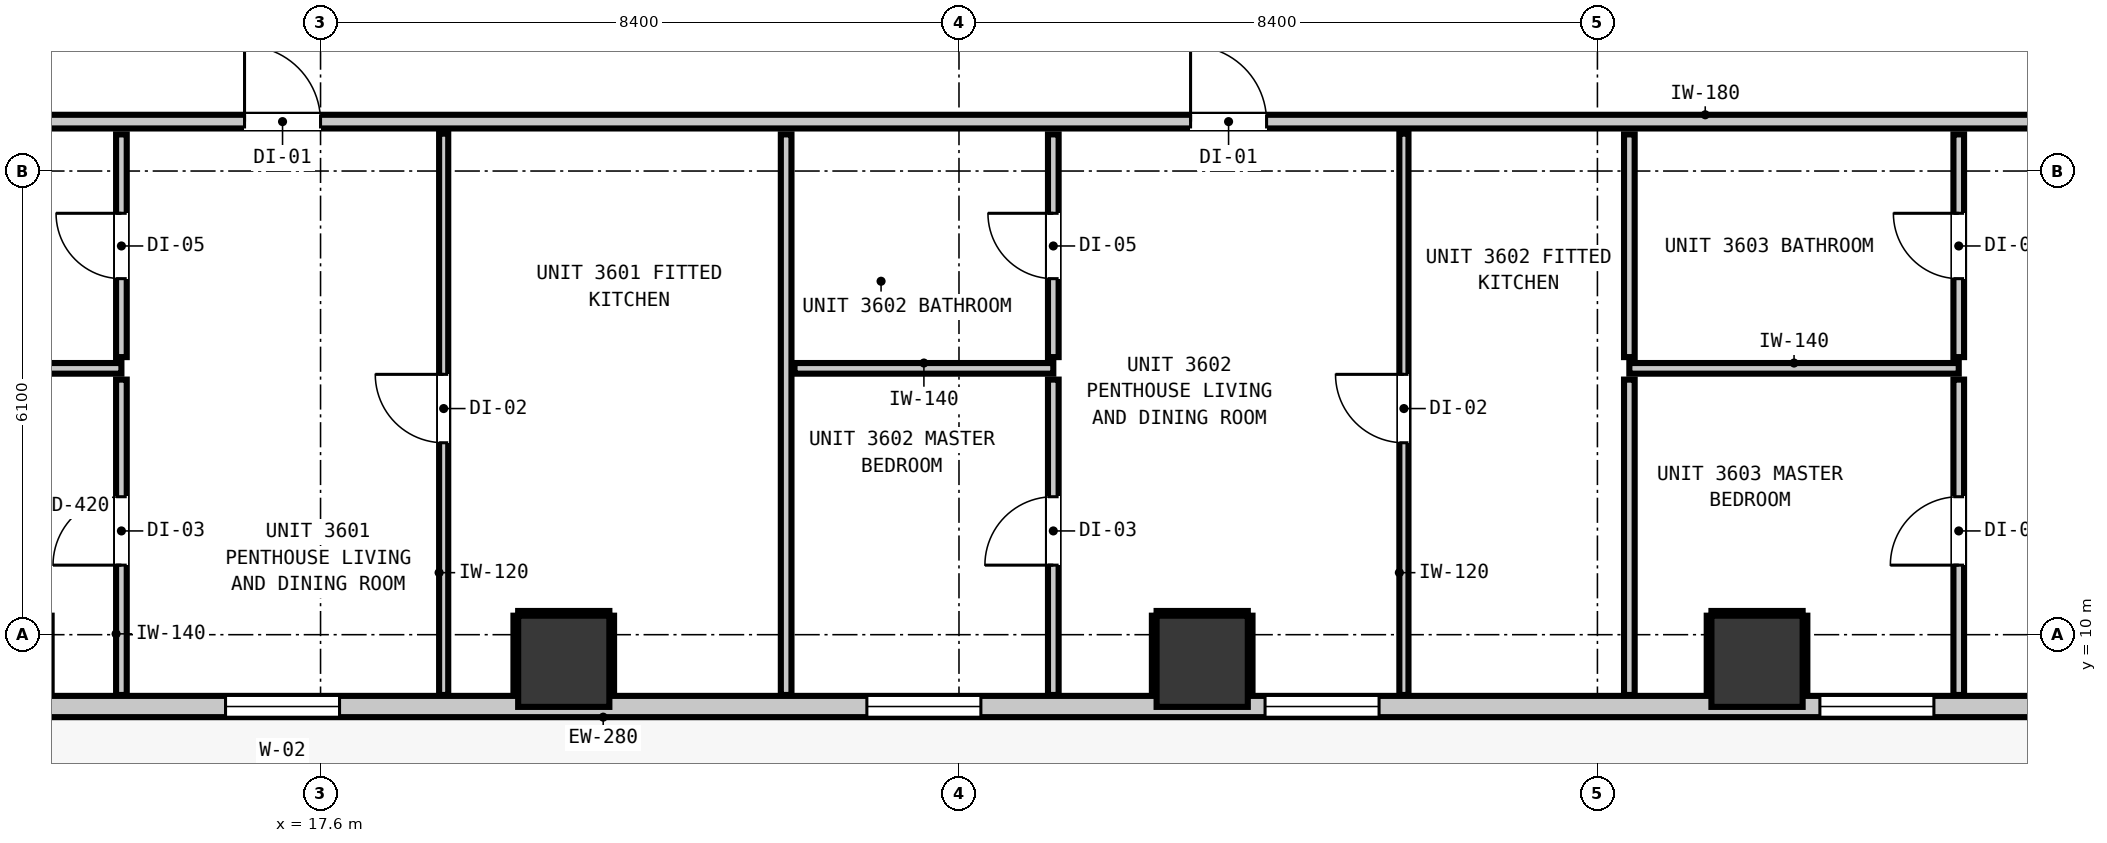
"""IFC4 building model, lengths in metres.
Left out: names, types, materials, properties, quantities, classifications, styles, units other than length and angle.
Written with IfcOpenShell. Run it as: python <this file> out.ifc"""

import sys

from ifc_helpers import new_model, si_unit, direction, frame, frame_2d, origin, origin_2d, place, context, subcontext, project, spatial, rectangle, extrude, element, fill, save


model = new_model("IFC4")
c1 = context("Model", 3, precision=1e-05, world=origin(), true_north=direction((0.0, 1.0)))
c2 = subcontext(c1, "Body", "Model", "MODEL_VIEW")
j1 = project(units=[si_unit("LENGTHUNIT", "METRE"), si_unit("PLANEANGLEUNIT", "RADIAN")], contexts=[c1])
p1 = place(None, origin())
s1 = spatial("IfcSite", under=j1, at=p1, CompositionType="ELEMENT")
p2 = place(p1, origin())
s2 = spatial("IfcBuilding", under=s1, at=p2, CompositionType="ELEMENT")
p3 = place(p2, frame((0.0, 0.0, 126.0)))
s3 = spatial("IfcBuildingStorey", under=s2, at=p3, CompositionType="ELEMENT", Elevation=126.0)
for number, where, z_axis, x_axis in (
    (1, (20.8, 9.65, -0.2), (0.0, 0.0, 1.0), (1.0, 0.0, 0.0)),
    (2, (29.2, 9.65, -0.2), (0.0, 0.0, 1.0), (1.0, 0.0, 0.0)),
    (3, (36.5, 9.65, -0.2), (0.0, 0.0, 1.0), (1.0, 0.0, 0.0)),
):
    element("IfcColumn", number, at=place(p3, frame(where, z_axis=z_axis, x_axis=x_axis)), inside=s3, PredefinedType="COLUMN", context=c2, shape_type="SweptSolid", body=[
        extrude(rectangle(XDim=1.2, YDim=1.2, at=origin_2d()), origin(), (0.0, 0.0, 1.0), 3.52),
    ])
p4 = place(p3, frame((46.645, 9.055, 0.0), z_axis=(0.0, 0.0, 1.0), x_axis=(-1.0, 0.0, 0.0)))
e4 = element("IfcWall", 4, at=p4, inside=s3, PredefinedType="STANDARD", context=c2, shape_type="SweptSolid", body=[
    extrude(rectangle(XDim=35.09, YDim=0.28, at=frame_2d((17.545, 0.0))), origin(), (0.0, 0.0, 1.0), 3.08),
])
p5 = place(p4, frame((2.307, 0.0, 0.0)))
e5 = element("IfcOpeningElement", 5, at=p5, cuts=e4, PredefinedType="OPENING", context=c2, shape_type="SweptSolid", body=[
    extrude(rectangle(XDim=1.0, YDim=2.15, at=frame_2d((0.5, 1.075))), frame((0.0, 0.15, 0.0), z_axis=(0.0, -1.0, 0.0), x_axis=(1.0, 0.0, 0.0)), (0.0, 0.0, 1.0), 0.3),
])
p6 = place(p4, frame((28.795, 0.0, 0.85)))
e6 = element("IfcOpeningElement", 6, at=p6, cuts=e4, PredefinedType="OPENING", context=c2, shape_type="SweptSolid", body=[
    extrude(rectangle(XDim=1.5, YDim=1.8, at=frame_2d((0.75, 0.9))), frame((0.0, 0.15, 0.0), z_axis=(0.0, -1.0, 0.0), x_axis=(1.0, 0.0, 0.0)), (0.0, 0.0, 1.0), 0.3),
])
p7 = place(p4, frame((34.133, 0.0, 0.85)))
e7 = element("IfcOpeningElement", 7, at=p7, cuts=e4, PredefinedType="OPENING", context=c2, shape_type="SweptSolid", body=[
    extrude(rectangle(XDim=0.58, YDim=1.5, at=frame_2d((0.29, 0.75))), frame((0.0, 0.15, 0.0), z_axis=(0.0, -1.0, 0.0), x_axis=(1.0, 0.0, 0.0)), (0.0, 0.0, 1.0), 0.3),
])
p8 = place(p4, frame((15.118, 0.0, 0.85)))
e8 = element("IfcOpeningElement", 8, at=p8, cuts=e4, PredefinedType="OPENING", context=c2, shape_type="SweptSolid", body=[
    extrude(rectangle(XDim=1.5, YDim=1.8, at=frame_2d((0.75, 0.9))), frame((0.0, 0.15, 0.0), z_axis=(0.0, -1.0, 0.0), x_axis=(1.0, 0.0, 0.0)), (0.0, 0.0, 1.0), 0.3),
])
p9 = place(p4, frame((20.357, 0.0, 0.85)))
e9 = element("IfcOpeningElement", 9, at=p9, cuts=e4, PredefinedType="OPENING", context=c2, shape_type="SweptSolid", body=[
    extrude(rectangle(XDim=1.5, YDim=1.8, at=frame_2d((0.75, 0.9))), frame((0.0, 0.15, 0.0), z_axis=(0.0, -1.0, 0.0), x_axis=(1.0, 0.0, 0.0)), (0.0, 0.0, 1.0), 0.3),
])
p10 = place(p4, frame((4.699, 0.0, 0.85)))
e10 = element("IfcOpeningElement", 10, at=p10, cuts=e4, PredefinedType="OPENING", context=c2, shape_type="SweptSolid", body=[
    extrude(rectangle(XDim=1.5, YDim=1.8, at=frame_2d((0.75, 0.9))), frame((0.0, 0.15, 0.0), z_axis=(0.0, -1.0, 0.0), x_axis=(1.0, 0.0, 0.0)), (0.0, 0.0, 1.0), 0.3),
])
p11 = place(p4, frame((7.818, 0.0, 0.85)))
e11 = element("IfcOpeningElement", 11, at=p11, cuts=e4, PredefinedType="OPENING", context=c2, shape_type="SweptSolid", body=[
    extrude(rectangle(XDim=1.5, YDim=1.8, at=frame_2d((0.75, 0.9))), frame((0.0, 0.15, 0.0), z_axis=(0.0, -1.0, 0.0), x_axis=(1.0, 0.0, 0.0)), (0.0, 0.0, 1.0), 0.3),
])
p12 = place(p3, frame((9.407, 16.75, 0.0), z_axis=(0.0, 0.0, 1.0), x_axis=(1.0, 0.0, 0.0)))
e12 = element("IfcWall", 12, at=p12, inside=s3, PredefinedType="PARTITIONING", context=c2, shape_type="SweptSolid", body=[
    extrude(rectangle(XDim=39.386, YDim=0.18, at=frame_2d((19.693, 0.0))), origin(), (0.0, 0.0, 1.0), 3.08),
])
p13 = place(p12, frame((7.193, 0.0, 0.0)))
e13 = element("IfcOpeningElement", 13, at=p13, cuts=e12, PredefinedType="OPENING", context=c2, shape_type="SweptSolid", body=[
    extrude(rectangle(XDim=1.0, YDim=2.15, at=frame_2d((0.5, 1.075))), frame((0.0, 0.1, 0.0), z_axis=(0.0, -1.0, 0.0), x_axis=(1.0, 0.0, 0.0)), (0.0, 0.0, 1.0), 0.2),
])
p14 = place(p12, frame((19.64, 0.0, 0.0)))
e14 = element("IfcOpeningElement", 14, at=p14, cuts=e12, PredefinedType="OPENING", context=c2, shape_type="SweptSolid", body=[
    extrude(rectangle(XDim=1.0, YDim=2.15, at=frame_2d((0.5, 1.075))), frame((0.0, 0.1, 0.0), z_axis=(0.0, -1.0, 0.0), x_axis=(1.0, 0.0, 0.0)), (0.0, 0.0, 1.0), 0.2),
])
p15 = place(p12, frame((32.183, 0.0, 0.0)))
e15 = element("IfcOpeningElement", 15, at=p15, cuts=e12, PredefinedType="OPENING", context=c2, shape_type="SweptSolid", body=[
    extrude(rectangle(XDim=1.0, YDim=2.15, at=frame_2d((0.5, 1.075))), frame((0.0, 0.1, 0.0), z_axis=(0.0, -1.0, 0.0), x_axis=(1.0, 0.0, 0.0)), (0.0, 0.0, 1.0), 0.2),
])
p16 = place(p3, frame((9.407, 13.504, 0.0), z_axis=(0.0, 0.0, 1.0), x_axis=(1.0, 0.0, 0.0)))
e16 = element("IfcWall", 16, at=p16, inside=s3, PredefinedType="PARTITIONING", context=c2, shape_type="SweptSolid", body=[
    extrude(rectangle(XDim=5.573, YDim=0.14, at=frame_2d((2.787, 0.0))), origin(), (0.0, 0.0, 1.0), 3.08),
])
p17 = place(p3, frame((23.836, 13.504, 0.0), z_axis=(0.0, 0.0, 1.0), x_axis=(1.0, 0.0, 0.0)))
e17 = element("IfcWall", 17, at=p17, inside=s3, PredefinedType="PARTITIONING", context=c2, shape_type="SweptSolid", body=[
    extrude(rectangle(XDim=3.405, YDim=0.14, at=frame_2d((1.703, 0.0))), origin(), (0.0, 0.0, 1.0), 3.08),
])
p18 = place(p3, frame((34.82, 13.504, 0.0), z_axis=(0.0, 0.0, 1.0), x_axis=(1.0, 0.0, 0.0)))
e18 = element("IfcWall", 18, at=p18, inside=s3, PredefinedType="PARTITIONING", context=c2, shape_type="SweptSolid", body=[
    extrude(rectangle(XDim=4.334, YDim=0.14, at=frame_2d((2.167, 0.0))), origin(), (0.0, 0.0, 1.0), 3.08),
])
p19 = place(p3, frame((14.98, 9.207, 0.0), z_axis=(0.0, 0.0, 1.0), x_axis=(0.0, 1.0, 0.0)))
e19 = element("IfcWall", 19, at=p19, inside=s3, PredefinedType="PARTITIONING", context=c2, shape_type="SweptSolid", body=[
    extrude(rectangle(XDim=4.149, YDim=0.14, at=frame_2d((2.074, 0.0))), origin(), (0.0, 0.0, 1.0), 3.08),
])
p20 = place(p19, frame((1.708, 0.0, 0.0)))
e20 = element("IfcOpeningElement", 20, at=p20, cuts=e19, PredefinedType="OPENING", context=c2, shape_type="SweptSolid", body=[
    extrude(rectangle(XDim=0.9, YDim=2.1, at=frame_2d((0.45, 1.05))), frame((0.0, 0.08, 0.0), z_axis=(0.0, -1.0, 0.0), x_axis=(1.0, 0.0, 0.0)), (0.0, 0.0, 1.0), 0.16),
])
p21 = place(p3, frame((14.98, 13.652, 0.0), z_axis=(0.0, 0.0, 1.0), x_axis=(0.0, 1.0, 0.0)))
e21 = element("IfcWall", 21, at=p21, inside=s3, PredefinedType="PARTITIONING", context=c2, shape_type="SweptSolid", body=[
    extrude(rectangle(XDim=2.93, YDim=0.14, at=frame_2d((1.465, 0.0))), origin(), (0.0, 0.0, 1.0), 3.08),
])
p22 = place(p21, frame((1.032, 0.0, 0.0)))
e22 = element("IfcOpeningElement", 22, at=p22, cuts=e21, PredefinedType="OPENING", context=c2, shape_type="SweptSolid", body=[
    extrude(rectangle(XDim=0.86, YDim=2.02, at=frame_2d((0.43, 1.01))), frame((0.0, 0.08, 0.0), z_axis=(0.0, -1.0, 0.0), x_axis=(1.0, 0.0, 0.0)), (0.0, 0.0, 1.0), 0.16),
])
p23 = place(p3, frame((23.726, 9.207, 0.0), z_axis=(0.0, 0.0, 1.0), x_axis=(0.0, 1.0, 0.0)))
e23 = element("IfcWall", 23, at=p23, inside=s3, PredefinedType="PARTITIONING", context=c2, shape_type="SweptSolid", body=[
    extrude(rectangle(XDim=7.375, YDim=0.14, at=frame_2d((3.688, 0.0))), origin(), (0.0, 0.0, 1.0), 3.08),
])
p24 = place(p3, frame((27.241, 9.207, 0.0), z_axis=(0.0, 0.0, 1.0), x_axis=(0.0, 1.0, 0.0)))
e24 = element("IfcWall", 24, at=p24, inside=s3, PredefinedType="PARTITIONING", context=c2, shape_type="SweptSolid", body=[
    extrude(rectangle(XDim=4.149, YDim=0.14, at=frame_2d((2.074, 0.0))), origin(), (0.0, 0.0, 1.0), 3.08),
])
p25 = place(p24, frame((1.708, 0.0, 0.0)))
e25 = element("IfcOpeningElement", 25, at=p25, cuts=e24, PredefinedType="OPENING", context=c2, shape_type="SweptSolid", body=[
    extrude(rectangle(XDim=0.9, YDim=2.1, at=frame_2d((0.45, 1.05))), frame((0.0, 0.08, 0.0), z_axis=(0.0, -1.0, 0.0), x_axis=(1.0, 0.0, 0.0)), (0.0, 0.0, 1.0), 0.16),
])
p26 = place(p3, frame((27.241, 13.652, 0.0), z_axis=(0.0, 0.0, 1.0), x_axis=(0.0, 1.0, 0.0)))
e26 = element("IfcWall", 26, at=p26, inside=s3, PredefinedType="PARTITIONING", context=c2, shape_type="SweptSolid", body=[
    extrude(rectangle(XDim=2.93, YDim=0.14, at=frame_2d((1.465, 0.0))), origin(), (0.0, 0.0, 1.0), 3.08),
])
p27 = place(p26, frame((1.032, 0.0, 0.0)))
e27 = element("IfcOpeningElement", 27, at=p27, cuts=e26, PredefinedType="OPENING", context=c2, shape_type="SweptSolid", body=[
    extrude(rectangle(XDim=0.86, YDim=2.02, at=frame_2d((0.43, 1.01))), frame((0.0, 0.08, 0.0), z_axis=(0.0, -1.0, 0.0), x_axis=(1.0, 0.0, 0.0)), (0.0, 0.0, 1.0), 0.16),
])
p28 = place(p3, frame((34.82, 9.207, 0.0), z_axis=(0.0, 0.0, 1.0), x_axis=(0.0, 1.0, 0.0)))
e28 = element("IfcWall", 28, at=p28, inside=s3, PredefinedType="PARTITIONING", context=c2, shape_type="SweptSolid", body=[
    extrude(rectangle(XDim=4.149, YDim=0.14, at=frame_2d((2.074, 0.0))), origin(), (0.0, 0.0, 1.0), 3.08),
])
p29 = place(p3, frame((34.82, 13.652, 0.0), z_axis=(0.0, 0.0, 1.0), x_axis=(0.0, 1.0, 0.0)))
e29 = element("IfcWall", 29, at=p29, inside=s3, PredefinedType="PARTITIONING", context=c2, shape_type="SweptSolid", body=[
    extrude(rectangle(XDim=2.93, YDim=0.14, at=frame_2d((1.465, 0.0))), origin(), (0.0, 0.0, 1.0), 3.08),
])
p30 = place(p3, frame((39.154, 9.207, 0.0), z_axis=(0.0, 0.0, 1.0), x_axis=(0.0, 1.0, 0.0)))
e30 = element("IfcWall", 30, at=p30, inside=s3, PredefinedType="PARTITIONING", context=c2, shape_type="SweptSolid", body=[
    extrude(rectangle(XDim=4.149, YDim=0.14, at=frame_2d((2.074, 0.0))), origin(), (0.0, 0.0, 1.0), 3.08),
])
p31 = place(p30, frame((1.708, 0.0, 0.0)))
e31 = element("IfcOpeningElement", 31, at=p31, cuts=e30, PredefinedType="OPENING", context=c2, shape_type="SweptSolid", body=[
    extrude(rectangle(XDim=0.9, YDim=2.1, at=frame_2d((0.45, 1.05))), frame((0.0, 0.08, 0.0), z_axis=(0.0, -1.0, 0.0), x_axis=(1.0, 0.0, 0.0)), (0.0, 0.0, 1.0), 0.16),
])
p32 = place(p3, frame((39.154, 13.652, 0.0), z_axis=(0.0, 0.0, 1.0), x_axis=(0.0, 1.0, 0.0)))
e32 = element("IfcWall", 32, at=p32, inside=s3, PredefinedType="PARTITIONING", context=c2, shape_type="SweptSolid", body=[
    extrude(rectangle(XDim=2.93, YDim=0.14, at=frame_2d((1.465, 0.0))), origin(), (0.0, 0.0, 1.0), 3.08),
])
p33 = place(p32, frame((1.032, 0.0, 0.0)))
e33 = element("IfcOpeningElement", 33, at=p33, cuts=e32, PredefinedType="OPENING", context=c2, shape_type="SweptSolid", body=[
    extrude(rectangle(XDim=0.86, YDim=2.02, at=frame_2d((0.43, 1.01))), frame((0.0, 0.08, 0.0), z_axis=(0.0, -1.0, 0.0), x_axis=(1.0, 0.0, 0.0)), (0.0, 0.0, 1.0), 0.16),
])
p34 = place(p3, frame((19.22, 9.207, 0.0), z_axis=(0.0, 0.0, 1.0), x_axis=(0.0, 1.0, 0.0)))
e34 = element("IfcWall", 34, at=p34, inside=s3, PredefinedType="PARTITIONING", context=c2, shape_type="SweptSolid", body=[
    extrude(rectangle(XDim=7.385, YDim=0.12, at=frame_2d((3.692, 0.0))), origin(), (0.0, 0.0, 1.0), 3.08),
])
p35 = place(p34, frame((3.318, 0.0, 0.0)))
e35 = element("IfcOpeningElement", 35, at=p35, cuts=e34, PredefinedType="OPENING", context=c2, shape_type="SweptSolid", body=[
    extrude(rectangle(XDim=0.9, YDim=2.1, at=frame_2d((0.45, 1.05))), frame((0.0, 0.07, 0.0), z_axis=(0.0, -1.0, 0.0), x_axis=(1.0, 0.0, 0.0)), (0.0, 0.0, 1.0), 0.14),
])
p36 = place(p3, frame((31.854, 9.207, 0.0), z_axis=(0.0, 0.0, 1.0), x_axis=(0.0, 1.0, 0.0)))
e36 = element("IfcWall", 36, at=p36, inside=s3, PredefinedType="PARTITIONING", context=c2, shape_type="SweptSolid", body=[
    extrude(rectangle(XDim=7.385, YDim=0.12, at=frame_2d((3.692, 0.0))), origin(), (0.0, 0.0, 1.0), 3.08),
])
p37 = place(p36, frame((3.318, 0.0, 0.0)))
e37 = element("IfcOpeningElement", 37, at=p37, cuts=e36, PredefinedType="OPENING", context=c2, shape_type="SweptSolid", body=[
    extrude(rectangle(XDim=0.9, YDim=2.1, at=frame_2d((0.45, 1.05))), frame((0.0, 0.07, 0.0), z_axis=(0.0, -1.0, 0.0), x_axis=(1.0, 0.0, 0.0)), (0.0, 0.0, 1.0), 0.14),
])
p38 = place(p3, frame((20.2, 10.282, 0.0), z_axis=(0.0, 0.0, 1.0), x_axis=(1.0, 0.0, 0.0)))
e38 = element("IfcWall", 38, at=p38, inside=s3, PredefinedType="PARTITIONING", context=c2, shape_type="SweptSolid", body=[
    extrude(rectangle(XDim=1.2, YDim=0.06, at=frame_2d((0.6, 0.0))), origin(), (0.0, 0.0, 1.0), 1.45),
])
for number, where, z_axis, x_axis in (
    (39, (20.168, 9.21, 0.0), (0.0, 0.0, 1.0), (0.0, 1.0, 0.0)),
    (40, (21.432, 9.21, 0.0), (0.0, 0.0, 1.0), (0.0, 1.0, 0.0)),
):
    element("IfcWall", number, at=place(p3, frame(where, z_axis=z_axis, x_axis=x_axis)), inside=s3, PredefinedType="PARTITIONING", context=c2, shape_type="SweptSolid", body=[
        extrude(rectangle(XDim=1.04, YDim=0.06, at=frame_2d((0.52, 0.0))), origin(), (0.0, 0.0, 1.0), 1.45),
    ])
p39 = place(p3, frame((28.6, 10.282, 0.0), z_axis=(0.0, 0.0, 1.0), x_axis=(1.0, 0.0, 0.0)))
e41 = element("IfcWall", 41, at=p39, inside=s3, PredefinedType="PARTITIONING", context=c2, shape_type="SweptSolid", body=[
    extrude(rectangle(XDim=1.2, YDim=0.06, at=frame_2d((0.6, 0.0))), origin(), (0.0, 0.0, 1.0), 1.45),
])
for number, where, z_axis, x_axis in (
    (42, (28.568, 9.21, 0.0), (0.0, 0.0, 1.0), (0.0, 1.0, 0.0)),
    (43, (29.832, 9.21, 0.0), (0.0, 0.0, 1.0), (0.0, 1.0, 0.0)),
):
    element("IfcWall", number, at=place(p3, frame(where, z_axis=z_axis, x_axis=x_axis)), inside=s3, PredefinedType="PARTITIONING", context=c2, shape_type="SweptSolid", body=[
        extrude(rectangle(XDim=1.04, YDim=0.06, at=frame_2d((0.52, 0.0))), origin(), (0.0, 0.0, 1.0), 1.45),
    ])
p40 = place(p3, frame((35.9, 10.282, 0.0), z_axis=(0.0, 0.0, 1.0), x_axis=(1.0, 0.0, 0.0)))
e44 = element("IfcWall", 44, at=p40, inside=s3, PredefinedType="PARTITIONING", context=c2, shape_type="SweptSolid", body=[
    extrude(rectangle(XDim=1.2, YDim=0.06, at=frame_2d((0.6, 0.0))), origin(), (0.0, 0.0, 1.0), 1.45),
])
for number, where, z_axis, x_axis in (
    (45, (35.868, 9.21, 0.0), (0.0, 0.0, 1.0), (0.0, 1.0, 0.0)),
    (46, (37.132, 9.21, 0.0), (0.0, 0.0, 1.0), (0.0, 1.0, 0.0)),
):
    element("IfcWall", number, at=place(p3, frame(where, z_axis=z_axis, x_axis=x_axis)), inside=s3, PredefinedType="PARTITIONING", context=c2, shape_type="SweptSolid", body=[
        extrude(rectangle(XDim=1.04, YDim=0.06, at=frame_2d((0.52, 0.0))), origin(), (0.0, 0.0, 1.0), 1.45),
    ])
p41 = place(p6, origin())
e47 = element("IfcWindow", 47, at=p41, inside=s3, PartitioningType="SINGLE_PANEL", PredefinedType="WINDOW", context=c2, shape_type="SweptSolid", body=[
    extrude(rectangle(XDim=1.5, YDim=1.8, at=frame_2d((0.75, 0.9))), frame((0.0, 0.03, 0.0), z_axis=(0.0, -1.0, 0.0), x_axis=(1.0, 0.0, 0.0)), (0.0, 0.0, 1.0), 0.06),
])
fill(e6, e47)
p42 = place(p8, origin())
e48 = element("IfcWindow", 48, at=p42, inside=s3, PartitioningType="SINGLE_PANEL", PredefinedType="WINDOW", context=c2, shape_type="SweptSolid", body=[
    extrude(rectangle(XDim=1.5, YDim=1.8, at=frame_2d((0.75, 0.9))), frame((0.0, 0.03, 0.0), z_axis=(0.0, -1.0, 0.0), x_axis=(1.0, 0.0, 0.0)), (0.0, 0.0, 1.0), 0.06),
])
fill(e8, e48)
p43 = place(p9, origin())
e49 = element("IfcWindow", 49, at=p43, inside=s3, PartitioningType="SINGLE_PANEL", PredefinedType="WINDOW", context=c2, shape_type="SweptSolid", body=[
    extrude(rectangle(XDim=1.5, YDim=1.8, at=frame_2d((0.75, 0.9))), frame((0.0, 0.03, 0.0), z_axis=(0.0, -1.0, 0.0), x_axis=(1.0, 0.0, 0.0)), (0.0, 0.0, 1.0), 0.06),
])
fill(e9, e49)
p44 = place(p11, origin())
e50 = element("IfcWindow", 50, at=p44, inside=s3, PartitioningType="SINGLE_PANEL", PredefinedType="WINDOW", context=c2, shape_type="SweptSolid", body=[
    extrude(rectangle(XDim=1.5, YDim=1.8, at=frame_2d((0.75, 0.9))), frame((0.0, 0.03, 0.0), z_axis=(0.0, -1.0, 0.0), x_axis=(1.0, 0.0, 0.0)), (0.0, 0.0, 1.0), 0.06),
])
fill(e11, e50)
p45 = place(p13, origin())
e51 = element("IfcDoor", 51, at=p45, inside=s3, OperationType="SINGLE_SWING_LEFT", PredefinedType="DOOR", context=c2, shape_type="SweptSolid", body=[
    extrude(rectangle(XDim=1.0, YDim=2.15, at=frame_2d((0.5, 1.075))), frame((0.0, 0.025, 0.0), z_axis=(0.0, -1.0, 0.0), x_axis=(1.0, 0.0, 0.0)), (0.0, 0.0, 1.0), 0.05),
])
fill(e13, e51)
p46 = place(p22, origin())
e52 = element("IfcDoor", 52, at=p46, inside=s3, OperationType="SINGLE_SWING_RIGHT", PredefinedType="DOOR", context=c2, shape_type="SweptSolid", body=[
    extrude(rectangle(XDim=0.86, YDim=2.02, at=frame_2d((0.43, 1.01))), frame((0.0, 0.025, 0.0), z_axis=(0.0, -1.0, 0.0), x_axis=(1.0, 0.0, 0.0)), (0.0, 0.0, 1.0), 0.05),
])
fill(e22, e52)
p47 = place(p20, origin())
e53 = element("IfcDoor", 53, at=p47, inside=s3, OperationType="SINGLE_SWING_LEFT", PredefinedType="DOOR", context=c2, shape_type="SweptSolid", body=[
    extrude(rectangle(XDim=0.9, YDim=2.1, at=frame_2d((0.45, 1.05))), frame((0.0, 0.025, 0.0), z_axis=(0.0, -1.0, 0.0), x_axis=(1.0, 0.0, 0.0)), (0.0, 0.0, 1.0), 0.05),
])
fill(e20, e53)
p48 = place(p35, origin())
e54 = element("IfcDoor", 54, at=p48, inside=s3, OperationType="SINGLE_SWING_RIGHT", PredefinedType="DOOR", context=c2, shape_type="SweptSolid", body=[
    extrude(rectangle(XDim=0.9, YDim=2.1, at=frame_2d((0.45, 1.05))), frame((0.0, 0.025, 0.0), z_axis=(0.0, -1.0, 0.0), x_axis=(1.0, 0.0, 0.0)), (0.0, 0.0, 1.0), 0.05),
])
fill(e35, e54)
p49 = place(p14, origin())
e55 = element("IfcDoor", 55, at=p49, inside=s3, OperationType="SINGLE_SWING_LEFT", PredefinedType="DOOR", context=c2, shape_type="SweptSolid", body=[
    extrude(rectangle(XDim=1.0, YDim=2.15, at=frame_2d((0.5, 1.075))), frame((0.0, 0.025, 0.0), z_axis=(0.0, -1.0, 0.0), x_axis=(1.0, 0.0, 0.0)), (0.0, 0.0, 1.0), 0.05),
])
fill(e14, e55)
p50 = place(p27, origin())
e56 = element("IfcDoor", 56, at=p50, inside=s3, OperationType="SINGLE_SWING_RIGHT", PredefinedType="DOOR", context=c2, shape_type="SweptSolid", body=[
    extrude(rectangle(XDim=0.86, YDim=2.02, at=frame_2d((0.43, 1.01))), frame((0.0, 0.025, 0.0), z_axis=(0.0, -1.0, 0.0), x_axis=(1.0, 0.0, 0.0)), (0.0, 0.0, 1.0), 0.05),
])
fill(e27, e56)
p51 = place(p25, origin())
e57 = element("IfcDoor", 57, at=p51, inside=s3, OperationType="SINGLE_SWING_LEFT", PredefinedType="DOOR", context=c2, shape_type="SweptSolid", body=[
    extrude(rectangle(XDim=0.9, YDim=2.1, at=frame_2d((0.45, 1.05))), frame((0.0, 0.025, 0.0), z_axis=(0.0, -1.0, 0.0), x_axis=(1.0, 0.0, 0.0)), (0.0, 0.0, 1.0), 0.05),
])
fill(e25, e57)
p52 = place(p37, origin())
e58 = element("IfcDoor", 58, at=p52, inside=s3, OperationType="SINGLE_SWING_RIGHT", PredefinedType="DOOR", context=c2, shape_type="SweptSolid", body=[
    extrude(rectangle(XDim=0.9, YDim=2.1, at=frame_2d((0.45, 1.05))), frame((0.0, 0.025, 0.0), z_axis=(0.0, -1.0, 0.0), x_axis=(1.0, 0.0, 0.0)), (0.0, 0.0, 1.0), 0.05),
])
fill(e37, e58)
p53 = place(p33, origin())
e59 = element("IfcDoor", 59, at=p53, inside=s3, OperationType="SINGLE_SWING_RIGHT", PredefinedType="DOOR", context=c2, shape_type="SweptSolid", body=[
    extrude(rectangle(XDim=0.86, YDim=2.02, at=frame_2d((0.43, 1.01))), frame((0.0, 0.025, 0.0), z_axis=(0.0, -1.0, 0.0), x_axis=(1.0, 0.0, 0.0)), (0.0, 0.0, 1.0), 0.05),
])
fill(e33, e59)
p54 = place(p31, origin())
e60 = element("IfcDoor", 60, at=p54, inside=s3, OperationType="SINGLE_SWING_LEFT", PredefinedType="DOOR", context=c2, shape_type="SweptSolid", body=[
    extrude(rectangle(XDim=0.9, YDim=2.1, at=frame_2d((0.45, 1.05))), frame((0.0, 0.025, 0.0), z_axis=(0.0, -1.0, 0.0), x_axis=(1.0, 0.0, 0.0)), (0.0, 0.0, 1.0), 0.05),
])
fill(e31, e60)
save(model, sys.argv[1])
